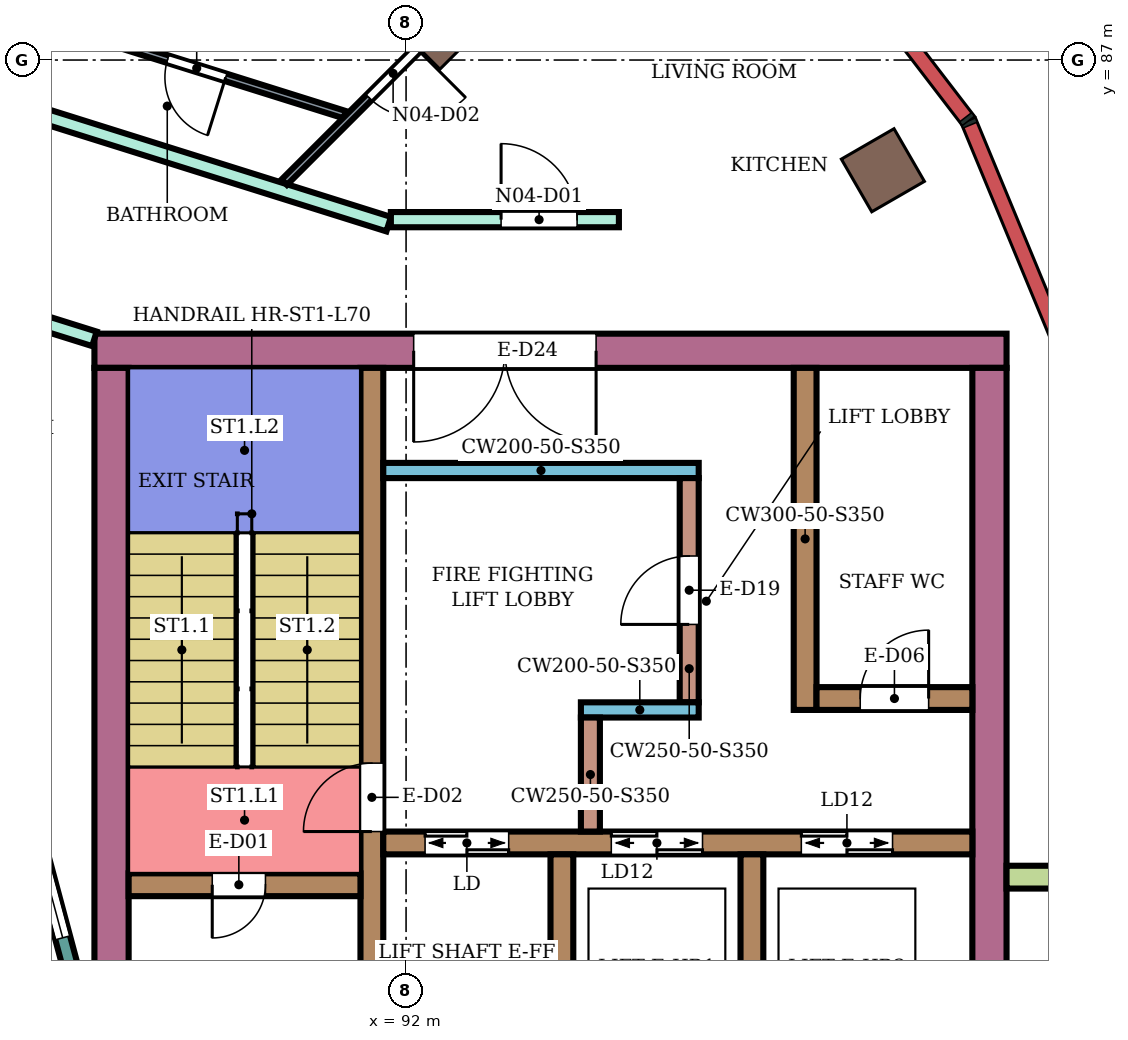
"""IFC4 building model, lengths in metres.
Left out: names, types, materials, properties, quantities, classifications, styles, units other than length and angle.
Written with IfcOpenShell. Run it as: python <this file> out.ifc"""

import sys

from ifc_helpers import new_model, si_unit, direction, frame, frame_2d, origin, origin_2d, place, context, subcontext, project, spatial, rectangle, extrude, element, fill, save


model = new_model("IFC4")
c1 = context("Model", 3, precision=1e-05, world=origin(), true_north=direction((0.0, 1.0)))
c2 = subcontext(c1, "Body", "Model", "MODEL_VIEW")
j1 = project(units=[si_unit("LENGTHUNIT", "METRE"), si_unit("PLANEANGLEUNIT", "RADIAN")], contexts=[c1])
p1 = place(None, origin())
s1 = spatial("IfcSite", under=j1, at=p1, CompositionType="ELEMENT")
p2 = place(p1, origin())
s2 = spatial("IfcBuilding", under=s1, at=p2, CompositionType="ELEMENT")
p3 = place(p2, frame((0.0, 0.0, 305.1)))
s3 = spatial("IfcBuildingStorey", under=s2, at=p3, CompositionType="ELEMENT", Elevation=305.1)
for number, where, z_axis, x_axis in (
    (1, (98.273, 85.55, 0.0), (0.0, 0.0, 1.0), (0.866, 0.5, 0.0)),
    (2, (92.445, 87.445, 0.0), (0.0, 0.0, 1.0), (0.707, 0.707, 0.0)),
):
    element("IfcColumn", number, at=place(p3, frame(where, z_axis=z_axis, x_axis=x_axis)), inside=s3, PredefinedType="COLUMN", context=c2, shape_type="SweptSolid", body=[
        extrude(rectangle(XDim=0.8, YDim=0.8, at=origin_2d()), origin(), (0.0, 0.0, 1.0), 4.2),
    ])
p4 = place(p3, frame((87.9, 83.175, 0.0), z_axis=(0.0, 0.0, 1.0), x_axis=(1.0, 0.0, 0.0)))
e3 = element("IfcWall", 3, at=p4, inside=s3, PredefinedType="SHEAR", context=c2, shape_type="SweptSolid", body=[
    extrude(rectangle(XDim=12.0, YDim=0.45, at=frame_2d((6.0, 0.0))), origin(), (0.0, 0.0, 1.0), 3.85),
])
p5 = place(p4, frame((4.2, 0.0, 0.0)))
e4 = element("IfcOpeningElement", 4, at=p5, cuts=e3, PredefinedType="OPENING", context=c2, shape_type="SweptSolid", body=[
    extrude(rectangle(XDim=2.4, YDim=2.4, at=frame_2d((1.2, 1.2))), frame((0.0, 0.235, 0.0), z_axis=(0.0, -1.0, 0.0), x_axis=(1.0, 0.0, 0.0)), (0.0, 0.0, 1.0), 0.47),
])
p6 = place(p3, frame((88.125, 75.0, 0.0), z_axis=(0.0, 0.0, 1.0), x_axis=(0.0, 1.0, 0.0)))
e5 = element("IfcWall", 5, at=p6, inside=s3, PredefinedType="SHEAR", context=c2, shape_type="SweptSolid", body=[
    extrude(rectangle(XDim=7.95, YDim=0.45, at=frame_2d((3.975, 0.0))), origin(), (0.0, 0.0, 1.0), 3.85),
])
p7 = place(p3, frame((99.675, 73.6, 0.0), z_axis=(0.0, 0.0, 1.0), x_axis=(0.0, 1.0, 0.0)))
e6 = element("IfcWall", 6, at=p7, inside=s3, PredefinedType="SHEAR", context=c2, shape_type="SweptSolid", body=[
    extrude(rectangle(XDim=9.35, YDim=0.45, at=frame_2d((4.675, 0.0))), origin(), (0.0, 0.0, 1.0), 3.85),
])
p8 = place(p3, frame((91.55, 75.0, 0.0), z_axis=(0.0, 0.0, 1.0), x_axis=(0.0, 1.0, 0.0)))
e7 = element("IfcWall", 7, at=p8, inside=s3, PredefinedType="SHEAR", context=c2, shape_type="SweptSolid", body=[
    extrude(rectangle(XDim=7.95, YDim=0.3, at=frame_2d((3.975, 0.0))), origin(), (0.0, 0.0, 1.0), 3.85),
])
p9 = place(p8, frame((1.85, 0.0, 0.0)))
e8 = element("IfcOpeningElement", 8, at=p9, cuts=e7, PredefinedType="OPENING", context=c2, shape_type="SweptSolid", body=[
    extrude(rectangle(XDim=0.9, YDim=2.1, at=frame_2d((0.45, 1.05))), frame((0.0, 0.16, 0.0), z_axis=(0.0, -1.0, 0.0), x_axis=(1.0, 0.0, 0.0)), (0.0, 0.0, 1.0), 0.32),
])
p10 = place(p3, frame((88.35, 76.15, 0.0), z_axis=(0.0, 0.0, 1.0), x_axis=(1.0, 0.0, 0.0)))
e9 = element("IfcWall", 9, at=p10, inside=s3, PredefinedType="SHEAR", context=c2, shape_type="SweptSolid", body=[
    extrude(rectangle(XDim=3.05, YDim=0.3, at=frame_2d((1.525, 0.0))), origin(), (0.0, 0.0, 1.0), 3.85),
])
p11 = place(p10, frame((1.1, 0.0, 0.0)))
e10 = element("IfcOpeningElement", 10, at=p11, cuts=e9, PredefinedType="OPENING", context=c2, shape_type="SweptSolid", body=[
    extrude(rectangle(XDim=0.7, YDim=2.0, at=frame_2d((0.35, 1.0))), frame((0.0, 0.16, 0.0), z_axis=(0.0, -1.0, 0.0), x_axis=(1.0, 0.0, 0.0)), (0.0, 0.0, 1.0), 0.32),
])
p12 = place(p3, frame((91.7, 76.7, 0.0), z_axis=(0.0, 0.0, 1.0), x_axis=(1.0, 0.0, 0.0)))
e11 = element("IfcWall", 11, at=p12, inside=s3, PredefinedType="SHEAR", context=c2, shape_type="SweptSolid", body=[
    extrude(rectangle(XDim=7.75, YDim=0.3, at=frame_2d((3.875, 0.0))), origin(), (0.0, 0.0, 1.0), 3.85),
])
p13 = place(p12, frame((0.55, 0.0, 0.0)))
e12 = element("IfcOpeningElement", 12, at=p13, cuts=e11, PredefinedType="OPENING", context=c2, shape_type="SweptSolid", body=[
    extrude(rectangle(XDim=1.1, YDim=2.1, at=frame_2d((0.55, 1.05))), frame((0.0, 0.16, 0.0), z_axis=(0.0, -1.0, 0.0), x_axis=(1.0, 0.0, 0.0)), (0.0, 0.0, 1.0), 0.32),
])
p14 = place(p12, frame((3.0, 0.0, 0.0)))
e13 = element("IfcOpeningElement", 13, at=p14, cuts=e11, PredefinedType="OPENING", context=c2, shape_type="SweptSolid", body=[
    extrude(rectangle(XDim=1.2, YDim=2.1, at=frame_2d((0.6, 1.05))), frame((0.0, 0.16, 0.0), z_axis=(0.0, -1.0, 0.0), x_axis=(1.0, 0.0, 0.0)), (0.0, 0.0, 1.0), 0.32),
])
p15 = place(p12, frame((5.5, 0.0, 0.0)))
e14 = element("IfcOpeningElement", 14, at=p15, cuts=e11, PredefinedType="OPENING", context=c2, shape_type="SweptSolid", body=[
    extrude(rectangle(XDim=1.2, YDim=2.1, at=frame_2d((0.6, 1.05))), frame((0.0, 0.16, 0.0), z_axis=(0.0, -1.0, 0.0), x_axis=(1.0, 0.0, 0.0)), (0.0, 0.0, 1.0), 0.32),
])
for number, where, z_axis, x_axis in (
    (15, (94.05, 74.0, 0.0), (0.0, 0.0, 1.0), (0.0, 1.0, 0.0)),
    (16, (96.55, 74.0, 0.0), (0.0, 0.0, 1.0), (0.0, 1.0, 0.0)),
):
    element("IfcWall", number, at=place(p3, frame(where, z_axis=z_axis, x_axis=x_axis)), inside=s3, PredefinedType="SHEAR", context=c2, shape_type="SweptSolid", body=[
        extrude(rectangle(XDim=2.55, YDim=0.3, at=frame_2d((1.275, 0.0))), origin(), (0.0, 0.0, 1.0), 3.85),
    ])
p16 = place(p3, frame((91.7, 81.6, 0.0), z_axis=(0.0, 0.0, 1.0), x_axis=(1.0, 0.0, 0.0)))
e17 = element("IfcWall", 17, at=p16, inside=s3, PredefinedType="SHEAR", context=c2, shape_type="SweptSolid", body=[
    extrude(rectangle(XDim=4.15, YDim=0.2, at=frame_2d((2.075, 0.0))), origin(), (0.0, 0.0, 1.0), 3.85),
])
p17 = place(p3, frame((95.725, 78.55, 0.0), z_axis=(0.0, 0.0, 1.0), x_axis=(0.0, 1.0, 0.0)))
e18 = element("IfcWall", 18, at=p17, inside=s3, PredefinedType="SHEAR", context=c2, shape_type="SweptSolid", body=[
    extrude(rectangle(XDim=2.95, YDim=0.25, at=frame_2d((1.475, 0.0))), origin(), (0.0, 0.0, 1.0), 3.85),
])
p18 = place(p17, frame((1.025, 0.0, 0.0)))
e19 = element("IfcOpeningElement", 19, at=p18, cuts=e18, PredefinedType="OPENING", context=c2, shape_type="SweptSolid", body=[
    extrude(rectangle(XDim=0.9, YDim=2.1, at=frame_2d((0.45, 1.05))), frame((0.0, 0.135, 0.0), z_axis=(0.0, -1.0, 0.0), x_axis=(1.0, 0.0, 0.0)), (0.0, 0.0, 1.0), 0.27),
])
p19 = place(p3, frame((94.3, 78.45, 0.0), z_axis=(0.0, 0.0, 1.0), x_axis=(1.0, 0.0, 0.0)))
e20 = element("IfcWall", 20, at=p19, inside=s3, PredefinedType="SHEAR", context=c2, shape_type="SweptSolid", body=[
    extrude(rectangle(XDim=1.55, YDim=0.2, at=frame_2d((0.775, 0.0))), origin(), (0.0, 0.0, 1.0), 3.85),
])
p20 = place(p3, frame((94.425, 76.85, 0.0), z_axis=(0.0, 0.0, 1.0), x_axis=(0.0, 1.0, 0.0)))
e21 = element("IfcWall", 21, at=p20, inside=s3, PredefinedType="SHEAR", context=c2, shape_type="SweptSolid", body=[
    extrude(rectangle(XDim=1.5, YDim=0.25, at=frame_2d((0.75, 0.0))), origin(), (0.0, 0.0, 1.0), 3.85),
])
p21 = place(p3, frame((97.25, 78.45, 0.0), z_axis=(0.0, 0.0, 1.0), x_axis=(0.0, 1.0, 0.0)))
e22 = element("IfcWall", 22, at=p21, inside=s3, PredefinedType="SHEAR", context=c2, shape_type="SweptSolid", body=[
    extrude(rectangle(XDim=4.5, YDim=0.3, at=frame_2d((2.25, 0.0))), origin(), (0.0, 0.0, 1.0), 3.85),
])
p22 = place(p3, frame((97.4, 78.6, 0.0), z_axis=(0.0, 0.0, 1.0), x_axis=(1.0, 0.0, 0.0)))
e23 = element("IfcWall", 23, at=p22, inside=s3, PredefinedType="SHEAR", context=c2, shape_type="SweptSolid", body=[
    extrude(rectangle(XDim=2.05, YDim=0.3, at=frame_2d((1.025, 0.0))), origin(), (0.0, 0.0, 1.0), 3.85),
])
p23 = place(p22, frame((0.575, 0.0, 0.0)))
e24 = element("IfcOpeningElement", 24, at=p23, cuts=e23, PredefinedType="OPENING", context=c2, shape_type="SweptSolid", body=[
    extrude(rectangle(XDim=0.9, YDim=2.1, at=frame_2d((0.45, 1.05))), frame((0.0, 0.16, 0.0), z_axis=(0.0, -1.0, 0.0), x_axis=(1.0, 0.0, 0.0)), (0.0, 0.0, 1.0), 0.32),
])
p24 = place(p3, frame((99.9, 76.25, 0.0), z_axis=(0.0, 0.0, 1.0), x_axis=(1.0, 0.0, 0.0)))
e25 = element("IfcWall", 25, at=p24, inside=s3, PredefinedType="NOTDEFINED", context=c2, shape_type="SweptSolid", body=[
    extrude(rectangle(XDim=2.416, YDim=0.3, at=frame_2d((1.208, 0.0))), origin(), (0.0, 0.0, 1.0), 4.2),
])
p25 = place(p3, frame((87.604, 75.0, 0.0), z_axis=(0.0, 0.0, 1.0), x_axis=(-0.258789828301, 0.965933654434, 0.0)))
e26 = element("IfcWall", 26, at=p25, inside=s3, PredefinedType="NOTDEFINED", context=c2, shape_type="SweptSolid", body=[
    extrude(rectangle(XDim=3.936, YDim=0.2, at=frame_2d((1.968, 0.0))), origin(), (0.0, 0.0, 1.0), 4.2),
])
p26 = place(p25, frame((0.468, 0.0, 0.9)))
e27 = element("IfcOpeningElement", 27, at=p26, cuts=e26, PredefinedType="OPENING", context=c2, shape_type="SweptSolid", body=[
    extrude(rectangle(XDim=3.0, YDim=2.3, at=frame_2d((1.5, 1.15))), frame((0.0, 0.11, 0.0), z_axis=(0.0, -1.0, 0.0), x_axis=(1.0, 0.0, 0.0)), (0.0, 0.0, 1.0), 0.22),
])
p27 = place(p3, frame((85.587, 84.057, 0.0), z_axis=(0.0, 0.0, 1.0), x_axis=(0.954239513179, -0.299043393987, 0.0)))
e28 = element("IfcWall", 28, at=p27, inside=s3, PredefinedType="PARTITIONING", context=c2, shape_type="SweptSolid", body=[
    extrude(rectangle(XDim=2.424, YDim=0.2, at=frame_2d((1.212, 0.0))), origin(), (0.0, 0.0, 1.0), 3.75),
])
p28 = place(p27, frame((0.762, 0.0, 0.0)))
e29 = element("IfcOpeningElement", 29, at=p28, cuts=e28, PredefinedType="OPENING", context=c2, shape_type="SweptSolid", body=[
    extrude(rectangle(XDim=0.9, YDim=2.1, at=frame_2d((0.45, 1.05))), frame((0.0, 0.11, 0.0), z_axis=(0.0, -1.0, 0.0), x_axis=(1.0, 0.0, 0.0)), (0.0, 0.0, 1.0), 0.22),
])
p29 = place(p3, frame((86.313, 86.554, 0.0), z_axis=(0.0, 0.0, 1.0), x_axis=(0.954081217458, -0.299548043717, 0.0)))
e30 = element("IfcWall", 30, at=p29, inside=s3, PredefinedType="PARTITIONING", context=c2, shape_type="SweptSolid", body=[
    extrude(rectangle(XDim=5.721, YDim=0.2, at=frame_2d((2.86, 0.0))), origin(), (0.0, 0.0, 1.0), 3.75),
])
p30 = place(p3, frame((86.681, 86.56, 0.0), z_axis=(0.0, 0.0, 1.0), x_axis=(0.500262593568, 0.865873742226, 0.0)))
e31 = element("IfcWall", 31, at=p30, inside=s3, PredefinedType="PARTITIONING", context=c2, shape_type="SweptSolid", body=[
    extrude(rectangle(XDim=8.946, YDim=0.2, at=frame_2d((4.473, 0.0))), origin(), (0.0, 0.0, 1.0), 3.75),
])
p31 = place(p3, frame((91.8, 84.9, 0.0), z_axis=(0.0, 0.0, 1.0), x_axis=(1.0, 0.0, 0.0)))
e32 = element("IfcWall", 32, at=p31, inside=s3, PredefinedType="PARTITIONING", context=c2, shape_type="SweptSolid", body=[
    extrude(rectangle(XDim=3.0, YDim=0.2, at=frame_2d((1.5, 0.0))), origin(), (0.0, 0.0, 1.0), 3.75),
])
p32 = place(p31, frame((1.45, 0.0, 0.0)))
e33 = element("IfcOpeningElement", 33, at=p32, cuts=e32, PredefinedType="OPENING", context=c2, shape_type="SweptSolid", body=[
    extrude(rectangle(XDim=1.0, YDim=2.1, at=frame_2d((0.5, 1.05))), frame((0.0, 0.11, 0.0), z_axis=(0.0, -1.0, 0.0), x_axis=(1.0, 0.0, 0.0)), (0.0, 0.0, 1.0), 0.22),
])
p33 = place(p3, frame((87.345, 87.488, 0.0), z_axis=(0.0, 0.0, 1.0), x_axis=(0.954151912322, -0.299322782647, 0.0)))
e34 = element("IfcWall", 34, at=p33, inside=s3, PredefinedType="PARTITIONING", context=c2, shape_type="SweptSolid", body=[
    extrude(rectangle(XDim=4.032, YDim=0.1, at=frame_2d((2.016, 0.0))), origin(), (0.0, 0.0, 1.0), 3.75),
])
p34 = place(p33, frame((1.591, 0.0, 0.0)))
e35 = element("IfcOpeningElement", 35, at=p34, cuts=e34, PredefinedType="OPENING", context=c2, shape_type="SweptSolid", body=[
    extrude(rectangle(XDim=0.8, YDim=2.1, at=frame_2d((0.4, 1.05))), frame((0.0, 0.06, 0.0), z_axis=(0.0, -1.0, 0.0), x_axis=(1.0, 0.0, 0.0)), (0.0, 0.0, 1.0), 0.12),
])
p35 = place(p3, frame((90.397, 85.393, 0.0), z_axis=(0.0, 0.0, 1.0), x_axis=(0.70720443438, 0.707009114505, 0.0)))
e36 = element("IfcWall", 36, at=p35, inside=s3, PredefinedType="PARTITIONING", context=c2, shape_type="SweptSolid", body=[
    extrude(rectangle(XDim=5.0, YDim=0.1, at=frame_2d((2.5, 0.0))), origin(), (0.0, 0.0, 1.0), 3.75),
])
p36 = place(p35, frame((1.575, 0.0, 0.0)))
e37 = element("IfcOpeningElement", 37, at=p36, cuts=e36, PredefinedType="OPENING", context=c2, shape_type="SweptSolid", body=[
    extrude(rectangle(XDim=0.9, YDim=2.1, at=frame_2d((0.45, 1.05))), frame((0.0, 0.06, 0.0), z_axis=(0.0, -1.0, 0.0), x_axis=(1.0, 0.0, 0.0)), (0.0, 0.0, 1.0), 0.12),
])
p37 = place(p26, origin())
e38 = element("IfcWindow", 38, at=p37, inside=s3, PartitioningType="SINGLE_PANEL", PredefinedType="WINDOW", context=c2, shape_type="SweptSolid", body=[
    extrude(rectangle(XDim=3.0, YDim=2.3, at=frame_2d((1.5, 1.15))), frame((0.0, 0.03, 0.0), z_axis=(0.0, -1.0, 0.0), x_axis=(1.0, 0.0, 0.0)), (0.0, 0.0, 1.0), 0.06),
])
fill(e27, e38)
p38 = place(p32, origin())
e39 = element("IfcDoor", 39, at=p38, inside=s3, OperationType="SINGLE_SWING_LEFT", PredefinedType="DOOR", context=c2, shape_type="SweptSolid", body=[
    extrude(rectangle(XDim=1.0, YDim=2.1, at=frame_2d((0.5, 1.05))), frame((0.0, 0.025, 0.0), z_axis=(0.0, -1.0, 0.0), x_axis=(1.0, 0.0, 0.0)), (0.0, 0.0, 1.0), 0.05),
])
fill(e33, e39)
p39 = place(p36, frame((0.9, 0.0, 0.0), z_axis=(0.0, 0.0, 1.0), x_axis=(-1.0, 0.0, 0.0)))
e40 = element("IfcDoor", 40, at=p39, inside=s3, OperationType="SINGLE_SWING_LEFT", PredefinedType="DOOR", context=c2, shape_type="SweptSolid", body=[
    extrude(rectangle(XDim=0.9, YDim=2.1, at=frame_2d((0.45, 1.05))), frame((0.0, 0.025, 0.0), z_axis=(0.0, -1.0, 0.0), x_axis=(1.0, 0.0, 0.0)), (0.0, 0.0, 1.0), 0.05),
])
fill(e37, e40)
p40 = place(p34, frame((0.8, 0.0, 0.0), z_axis=(0.0, 0.0, 1.0), x_axis=(-1.0, 0.0, 0.0)))
e41 = element("IfcDoor", 41, at=p40, inside=s3, OperationType="SINGLE_SWING_LEFT", PredefinedType="DOOR", context=c2, shape_type="SweptSolid", body=[
    extrude(rectangle(XDim=0.8, YDim=2.1, at=frame_2d((0.4, 1.05))), frame((0.0, 0.025, 0.0), z_axis=(0.0, -1.0, 0.0), x_axis=(1.0, 0.0, 0.0)), (0.0, 0.0, 1.0), 0.05),
])
fill(e35, e41)
p41 = place(p11, frame((0.7, 0.0, 0.0), z_axis=(0.0, 0.0, 1.0), x_axis=(-1.0, 0.0, 0.0)))
e42 = element("IfcDoor", 42, at=p41, inside=s3, OperationType="SINGLE_SWING_RIGHT", PredefinedType="DOOR", context=c2, shape_type="SweptSolid", body=[
    extrude(rectangle(XDim=0.7, YDim=2.0, at=frame_2d((0.35, 1.0))), frame((0.0, 0.025, 0.0), z_axis=(0.0, -1.0, 0.0), x_axis=(1.0, 0.0, 0.0)), (0.0, 0.0, 1.0), 0.05),
])
fill(e10, e42)
p42 = place(p9, origin())
e43 = element("IfcDoor", 43, at=p42, inside=s3, OperationType="SINGLE_SWING_LEFT", PredefinedType="DOOR", context=c2, shape_type="SweptSolid", body=[
    extrude(rectangle(XDim=0.9, YDim=2.1, at=frame_2d((0.45, 1.05))), frame((0.0, 0.025, 0.0), z_axis=(0.0, -1.0, 0.0), x_axis=(1.0, 0.0, 0.0)), (0.0, 0.0, 1.0), 0.05),
])
fill(e8, e43)
p43 = place(p13, origin())
e44 = element("IfcDoor", 44, at=p43, inside=s3, OperationType="DOUBLE_DOOR_SLIDING", PredefinedType="DOOR", context=c2, shape_type="SweptSolid", body=[
    extrude(rectangle(XDim=1.1, YDim=2.1, at=frame_2d((0.55, 1.05))), frame((0.0, 0.025, 0.0), z_axis=(0.0, -1.0, 0.0), x_axis=(1.0, 0.0, 0.0)), (0.0, 0.0, 1.0), 0.05),
])
fill(e12, e44)
p44 = place(p14, origin())
e45 = element("IfcDoor", 45, at=p44, inside=s3, OperationType="DOUBLE_DOOR_SLIDING", PredefinedType="DOOR", context=c2, shape_type="SweptSolid", body=[
    extrude(rectangle(XDim=1.2, YDim=2.1, at=frame_2d((0.6, 1.05))), frame((0.0, 0.025, 0.0), z_axis=(0.0, -1.0, 0.0), x_axis=(1.0, 0.0, 0.0)), (0.0, 0.0, 1.0), 0.05),
])
fill(e13, e45)
p45 = place(p15, origin())
e46 = element("IfcDoor", 46, at=p45, inside=s3, OperationType="DOUBLE_DOOR_SLIDING", PredefinedType="DOOR", context=c2, shape_type="SweptSolid", body=[
    extrude(rectangle(XDim=1.2, YDim=2.1, at=frame_2d((0.6, 1.05))), frame((0.0, 0.025, 0.0), z_axis=(0.0, -1.0, 0.0), x_axis=(1.0, 0.0, 0.0)), (0.0, 0.0, 1.0), 0.05),
])
fill(e14, e46)
p46 = place(p18, origin())
e47 = element("IfcDoor", 47, at=p46, inside=s3, OperationType="SINGLE_SWING_LEFT", PredefinedType="DOOR", context=c2, shape_type="SweptSolid", body=[
    extrude(rectangle(XDim=0.9, YDim=2.1, at=frame_2d((0.45, 1.05))), frame((0.0, 0.025, 0.0), z_axis=(0.0, -1.0, 0.0), x_axis=(1.0, 0.0, 0.0)), (0.0, 0.0, 1.0), 0.05),
])
fill(e19, e47)
p47 = place(p23, origin())
e48 = element("IfcDoor", 48, at=p47, inside=s3, OperationType="SINGLE_SWING_RIGHT", PredefinedType="DOOR", context=c2, shape_type="SweptSolid", body=[
    extrude(rectangle(XDim=0.9, YDim=2.1, at=frame_2d((0.45, 1.05))), frame((0.0, 0.025, 0.0), z_axis=(0.0, -1.0, 0.0), x_axis=(1.0, 0.0, 0.0)), (0.0, 0.0, 1.0), 0.05),
])
fill(e24, e48)
p48 = place(p5, frame((2.4, 0.0, 0.0), z_axis=(0.0, 0.0, 1.0), x_axis=(-1.0, 0.0, 0.0)))
e49 = element("IfcDoor", 49, at=p48, inside=s3, OperationType="DOUBLE_DOOR_SINGLE_SWING", PredefinedType="DOOR", context=c2, shape_type="SweptSolid", body=[
    extrude(rectangle(XDim=2.4, YDim=2.4, at=frame_2d((1.2, 1.2))), frame((0.0, 0.025, 0.0), z_axis=(0.0, -1.0, 0.0), x_axis=(1.0, 0.0, 0.0)), (0.0, 0.0, 1.0), 0.05),
])
fill(e4, e49)
save(model, sys.argv[1])
